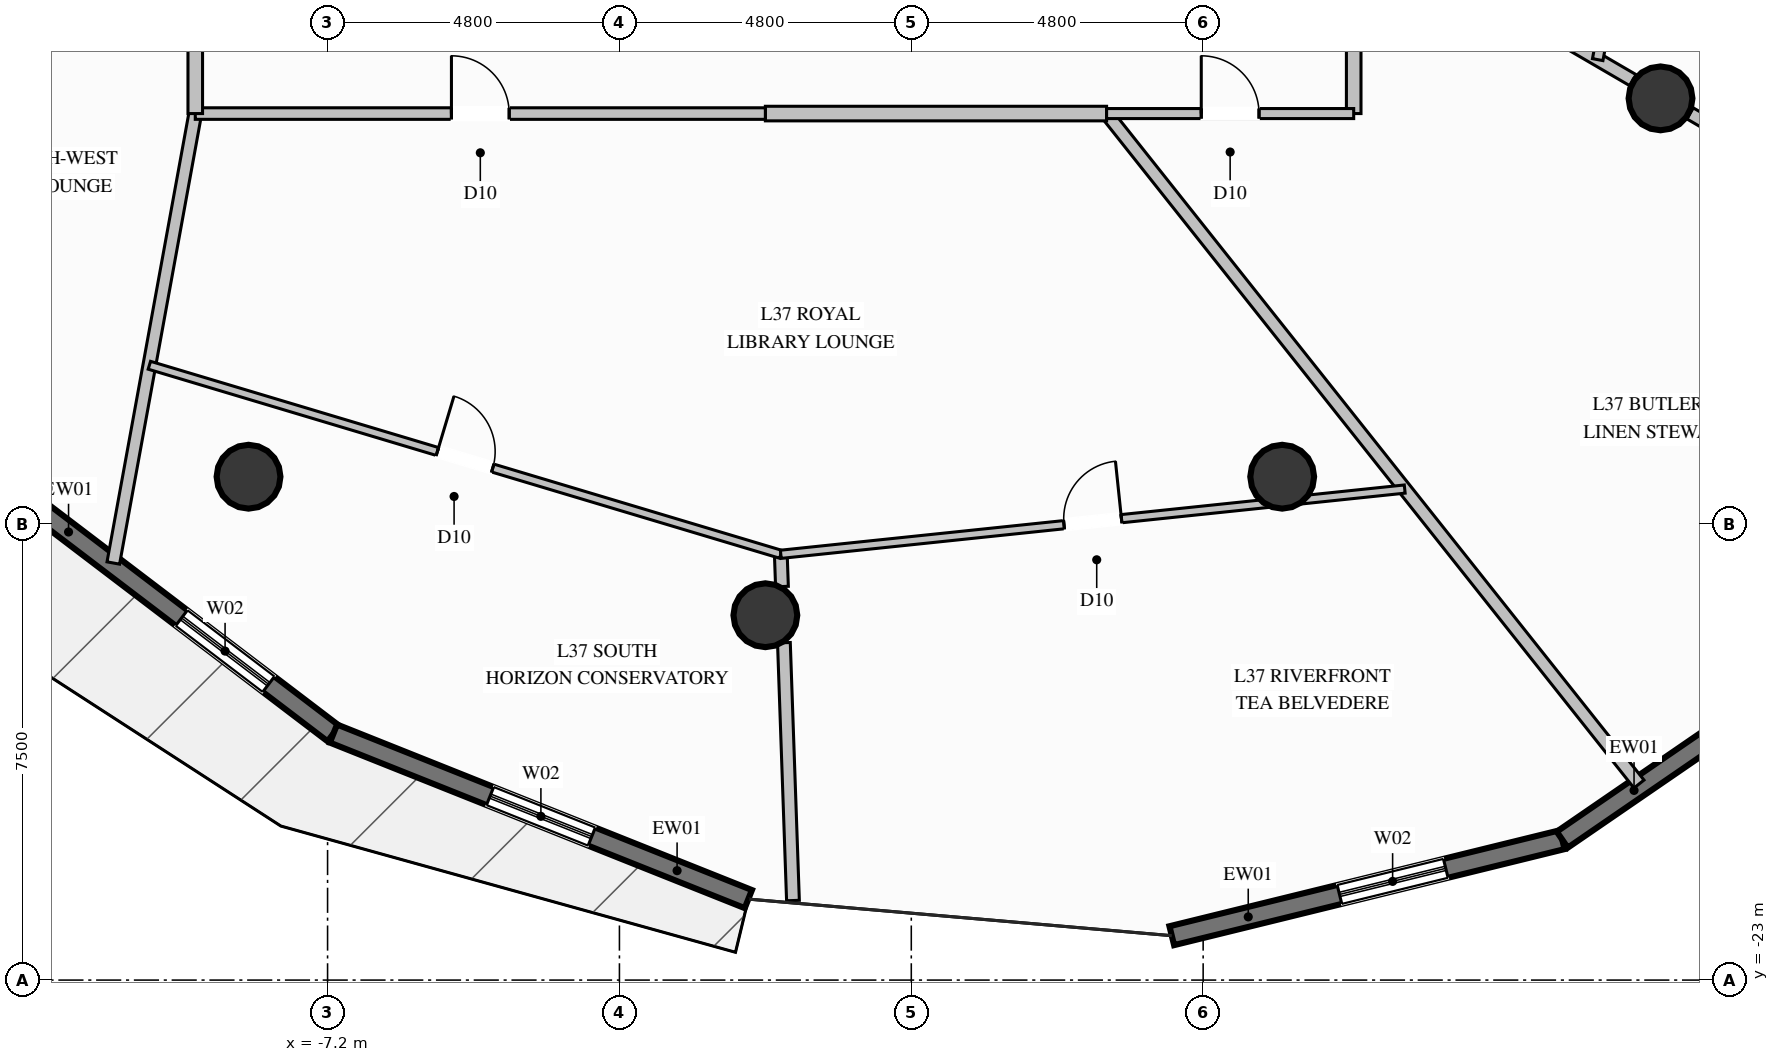
"""IFC4 building model, lengths in metres.
Left out: names, types, materials, properties, quantities, classifications, styles, units other than length and angle.
Written with IfcOpenShell. Run it as: python <this file> out.ifc"""

import sys

from ifc_helpers import new_model, si_unit, direction, frame, frame_2d, origin, origin_2d, place, context, subcontext, project, spatial, rectangle, circle, extrude, element, fill, save


model = new_model("IFC4")
c1 = context("Model", 3, precision=1e-05, world=origin(), true_north=direction((0.0, 1.0)))
c2 = subcontext(c1, "Body", "Model", "MODEL_VIEW")
j1 = project(units=[si_unit("LENGTHUNIT", "METRE"), si_unit("PLANEANGLEUNIT", "RADIAN")], contexts=[c1])
p1 = place(None, origin())
s1 = spatial("IfcSite", under=j1, at=p1, CompositionType="ELEMENT")
p2 = place(p1, origin())
s2 = spatial("IfcBuilding", under=s1, at=p2, CompositionType="ELEMENT")
p3 = place(p2, frame((0.0, 0.0, 145.8)))
s3 = spatial("IfcBuildingStorey", under=s2, at=p3, CompositionType="ELEMENT", Elevation=145.8)
for number, where, z_axis, x_axis in (
    (1, (-8.5, -14.722, 0.0), (0.0, 0.0, 1.0), (1.0, 0.0, 0.0)),
    (2, (0.0, -17.0, 0.0), (0.0, 0.0, 1.0), (1.0, 0.0, 0.0)),
    (3, (8.5, -14.722, 0.0), (0.0, 0.0, 1.0), (1.0, 0.0, 0.0)),
    (4, (14.722, -8.5, 0.0), (0.0, 0.0, 1.0), (1.0, 0.0, 0.0)),
):
    element("IfcColumn", number, at=place(p3, frame(where, z_axis=z_axis, x_axis=x_axis)), inside=s3, PredefinedType="COLUMN", context=c2, shape_type="SweptSolid", body=[
        extrude(circle(Radius=0.525, at=origin_2d()), origin(), (0.0, 0.0, 1.0), 3.6),
    ])
p4 = place(p3, frame((-7.103, -18.946, 0.0), z_axis=(0.0, 0.0, 1.0), x_axis=(-0.795837829304, 0.605509826054, 0.0)))
e5 = element("IfcWall", 5, at=p4, inside=s3, PredefinedType="SOLIDWALL", context=c2, shape_type="SweptSolid", body=[
    extrude(rectangle(XDim=7.559, YDim=0.32, at=frame_2d((3.78, 0.0))), origin(), (0.0, 0.0, 1.0), 3.35),
])
p5 = place(p4, frame((1.34, 0.0, 0.35)))
e6 = element("IfcOpeningElement", 6, at=p5, cuts=e5, PredefinedType="OPENING", context=c2, shape_type="SweptSolid", body=[
    extrude(rectangle(XDim=1.8, YDim=2.6, at=frame_2d((0.9, 1.3))), frame((0.0, 0.17, 0.0), z_axis=(0.0, -1.0, 0.0), x_axis=(1.0, 0.0, 0.0)), (0.0, 0.0, 1.0), 0.34),
])
p6 = place(p3, frame((-0.28, -21.668, 0.0), z_axis=(0.0, 0.0, 1.0), x_axis=(-0.928817816333, 0.37053672431, 0.0)))
e7 = element("IfcWall", 7, at=p6, inside=s3, PredefinedType="SOLIDWALL", context=c2, shape_type="SweptSolid", body=[
    extrude(rectangle(XDim=7.346, YDim=0.32, at=frame_2d((3.673, 0.0))), origin(), (0.0, 0.0, 1.0), 3.35),
])
p7 = place(p6, frame((2.773, 0.0, 0.35)))
e8 = element("IfcOpeningElement", 8, at=p7, cuts=e7, PredefinedType="OPENING", context=c2, shape_type="SweptSolid", body=[
    extrude(rectangle(XDim=1.8, YDim=2.6, at=frame_2d((0.9, 1.3))), frame((0.0, 0.17, 0.0), z_axis=(0.0, -1.0, 0.0), x_axis=(1.0, 0.0, 0.0)), (0.0, 0.0, 1.0), 0.34),
])
p8 = place(p3, frame((13.106, -20.691, 0.0), z_axis=(0.0, 0.0, 1.0), x_axis=(-0.971073377094, -0.238781272926, 0.0)))
e9 = element("IfcWall", 9, at=p8, inside=s3, PredefinedType="SOLIDWALL", context=c2, shape_type="SweptSolid", body=[
    extrude(rectangle(XDim=6.613, YDim=0.32, at=frame_2d((3.307, 0.0))), origin(), (0.0, 0.0, 1.0), 3.35),
])
p9 = place(p8, frame((1.973, 0.0, 0.35)))
e10 = element("IfcOpeningElement", 10, at=p9, cuts=e9, PredefinedType="OPENING", context=c2, shape_type="SweptSolid", body=[
    extrude(rectangle(XDim=1.8, YDim=2.6, at=frame_2d((0.9, 1.3))), frame((0.0, 0.17, 0.0), z_axis=(0.0, -1.0, 0.0), x_axis=(1.0, 0.0, 0.0)), (0.0, 0.0, 1.0), 0.34),
])
p10 = place(p3, frame((18.357, -17.087, 0.0), z_axis=(0.0, 0.0, 1.0), x_axis=(-0.824484596177, -0.565884396911, 0.0)))
e11 = element("IfcWall", 11, at=p10, inside=s3, PredefinedType="SOLIDWALL", context=c2, shape_type="SweptSolid", body=[
    extrude(rectangle(XDim=6.369, YDim=0.32, at=frame_2d((3.185, 0.0))), origin(), (0.0, 0.0, 1.0), 3.35),
])
p11 = place(p10, frame((1.455, 0.0, 0.35)))
e12 = element("IfcOpeningElement", 12, at=p11, cuts=e11, PredefinedType="OPENING", context=c2, shape_type="SweptSolid", body=[
    extrude(rectangle(XDim=1.8, YDim=2.6, at=frame_2d((0.9, 1.3))), frame((0.0, 0.17, 0.0), z_axis=(0.0, -1.0, 0.0), x_axis=(1.0, 0.0, 0.0)), (0.0, 0.0, 1.0), 0.34),
])
p12 = place(p3, frame((-9.376, -5.525, 0.0), z_axis=(0.0, 0.0, 1.0), x_axis=(-0.8717334026, -0.489980484092, 0.0)))
e13 = element("IfcWall", 13, at=p12, inside=s3, PredefinedType="PARTITIONING", context=c2, shape_type="SweptSolid", body=[
    extrude(rectangle(XDim=5.574, YDim=0.21, at=frame_2d((2.787, 0.0))), origin(), (0.0, 0.0, 1.0), 2.791),
])
p13 = place(p3, frame((9.676, -5.525, 0.0), z_axis=(0.0, 0.0, 1.0), x_axis=(0.864030429533, -0.503439586088, 0.0)))
e14 = element("IfcWall", 14, at=p13, inside=s3, PredefinedType="PARTITIONING", context=c2, shape_type="SweptSolid", body=[
    extrude(rectangle(XDim=5.313, YDim=0.21, at=frame_2d((2.657, 0.0))), origin(), (0.0, 0.0, 1.0), 2.791),
])
p14 = place(p3, frame((15.208, -8.747, 0.0), z_axis=(0.0, 0.0, 1.0), x_axis=(0.864059428721, -0.503389812808, 0.0)))
e15 = element("IfcWall", 15, at=p14, inside=s3, PredefinedType="PARTITIONING", context=c2, shape_type="SweptSolid", body=[
    extrude(rectangle(XDim=7.256, YDim=0.21, at=frame_2d((3.628, 0.0))), origin(), (0.0, 0.0, 1.0), 3.35),
])
p15 = place(p3, frame((13.689, -7.863, 0.0), z_axis=(0.0, 0.0, 1.0), x_axis=(0.185039216189, 0.982731137429, 0.0)))
e16 = element("IfcWall", 16, at=p15, inside=s3, PredefinedType="PLUMBINGWALL", context=c2, shape_type="SweptSolid", body=[
    extrude(rectangle(XDim=3.318, YDim=0.175, at=frame_2d((1.659, 0.0))), origin(), (0.0, 0.0, 1.0), 3.35),
])
p16 = place(p3, frame((5.612, -8.75, 0.0), z_axis=(0.0, 0.0, 1.0), x_axis=(0.62188276913, -0.783110350755, 0.0)))
e17 = element("IfcWall", 17, at=p16, inside=s3, PredefinedType="PARTITIONING", context=c2, shape_type="SweptSolid", body=[
    extrude(rectangle(XDim=14.08, YDim=0.21, at=frame_2d((7.04, 0.0))), origin(), (0.0, 0.0, 1.0), 3.35),
])
p17 = place(p3, frame((-9.376, -8.75, 0.0), z_axis=(0.0, 0.0, 1.0), x_axis=(-0.179440173007, -0.983768887652, 0.0)))
e18 = element("IfcWall", 18, at=p17, inside=s3, PredefinedType="PARTITIONING", context=c2, shape_type="SweptSolid", body=[
    extrude(rectangle(XDim=7.513, YDim=0.21, at=frame_2d((3.756, 0.0))), origin(), (0.0, 0.0, 1.0), 3.35),
])
p18 = place(p3, frame((0.0, -8.75, 0.0), z_axis=(0.0, 0.0, 1.0), x_axis=(1.0, 0.0, 0.0)))
e19 = element("IfcWall", 19, at=p18, inside=s3, PredefinedType="PARTITIONING", context=c2, shape_type="SweptSolid", body=[
    extrude(rectangle(XDim=5.612, YDim=0.24, at=frame_2d((2.806, 0.0))), origin(), (0.0, 0.0, 1.0), 3.35),
])
p19 = place(p3, frame((-9.376, -8.75, 0.0), z_axis=(0.0, 0.0, 1.0), x_axis=(1.0, 0.0, 0.0)))
e20 = element("IfcWall", 20, at=p19, inside=s3, PredefinedType="PARTITIONING", context=c2, shape_type="SweptSolid", body=[
    extrude(rectangle(XDim=9.376, YDim=0.19, at=frame_2d((4.688, 0.0))), origin(), (0.0, 0.0, 1.0), 3.35),
])
p20 = place(p19, frame((4.213, 0.0, 0.0)))
e21 = element("IfcOpeningElement", 21, at=p20, cuts=e20, PredefinedType="OPENING", context=c2, shape_type="SweptSolid", body=[
    extrude(rectangle(XDim=0.95, YDim=2.1, at=frame_2d((0.475, 1.05))), frame((0.0, 0.105, 0.0), z_axis=(0.0, -1.0, 0.0), x_axis=(1.0, 0.0, 0.0)), (0.0, 0.0, 1.0), 0.21),
])
p21 = place(p3, frame((-9.376, -5.525, 0.0), z_axis=(0.0, 0.0, 1.0), x_axis=(0.0, -1.0, 0.0)))
e22 = element("IfcWall", 22, at=p21, inside=s3, PredefinedType="PARTITIONING", context=c2, shape_type="SweptSolid", body=[
    extrude(rectangle(XDim=3.225, YDim=0.24, at=frame_2d((1.613, 0.0))), origin(), (0.0, 0.0, 1.0), 3.35),
])
p22 = place(p21, frame((1.112, 0.0, 0.0)))
e23 = element("IfcOpeningElement", 23, at=p22, cuts=e22, PredefinedType="OPENING", context=c2, shape_type="SweptSolid", body=[
    extrude(rectangle(XDim=1.0, YDim=2.2, at=frame_2d((0.5, 1.1))), frame((0.0, 0.13, 0.0), z_axis=(0.0, -1.0, 0.0), x_axis=(1.0, 0.0, 0.0)), (0.0, 0.0, 1.0), 0.26),
])
p23 = place(p3, frame((0.254, -15.998, 0.0), z_axis=(0.0, 0.0, 1.0), x_axis=(0.035904977548, -0.999355208416, 0.0)))
e24 = element("IfcWall", 24, at=p23, inside=s3, PredefinedType="PARTITIONING", context=c2, shape_type="SweptSolid", body=[
    extrude(rectangle(XDim=0.53, YDim=0.21, at=frame_2d((0.265, 0.0))), origin(), (0.0, 0.0, 1.0), 3.35),
])
p24 = place(p3, frame((0.305, -17.452, 0.0), z_axis=(0.0, 0.0, 1.0), x_axis=(0.035159913523, -0.999381699093, 0.0)))
e25 = element("IfcWall", 25, at=p24, inside=s3, PredefinedType="PARTITIONING", context=c2, shape_type="SweptSolid", body=[
    extrude(rectangle(XDim=4.243, YDim=0.21, at=frame_2d((2.121, 0.0))), origin(), (0.0, 0.0, 1.0), 3.35),
])
p25 = place(p3, frame((-10.131, -12.889, 0.0), z_axis=(0.0, 0.0, 1.0), x_axis=(0.957987914755, -0.286808568879, 0.0)))
e26 = element("IfcWall", 26, at=p25, inside=s3, PredefinedType="PARTITIONING", context=c2, shape_type="SweptSolid", body=[
    extrude(rectangle(XDim=10.84, YDim=0.135, at=frame_2d((5.42, 0.0))), origin(), (0.0, 0.0, 1.0), 2.879),
])
p26 = place(p25, frame((4.945, 0.0, 0.0)))
e27 = element("IfcOpeningElement", 27, at=p26, cuts=e26, PredefinedType="OPENING", context=c2, shape_type="SweptSolid", body=[
    extrude(rectangle(XDim=0.95, YDim=2.1, at=frame_2d((0.475, 1.05))), frame((0.0, 0.078, 0.0), z_axis=(0.0, -1.0, 0.0), x_axis=(1.0, 0.0, 0.0)), (0.0, 0.0, 1.0), 0.155),
])
p27 = place(p3, frame((0.254, -15.998, 0.0), z_axis=(0.0, 0.0, 1.0), x_axis=(0.994576924976, 0.104003559097, 0.0)))
e28 = element("IfcWall", 28, at=p27, inside=s3, PredefinedType="PARTITIONING", context=c2, shape_type="SweptSolid", body=[
    extrude(rectangle(XDim=10.317, YDim=0.135, at=frame_2d((5.158, 0.0))), origin(), (0.0, 0.0, 1.0), 2.879),
])
p28 = place(p27, frame((4.683, 0.0, 0.0)))
e29 = element("IfcOpeningElement", 29, at=p28, cuts=e28, PredefinedType="OPENING", context=c2, shape_type="SweptSolid", body=[
    extrude(rectangle(XDim=0.95, YDim=2.1, at=frame_2d((0.475, 1.05))), frame((0.0, 0.078, 0.0), z_axis=(0.0, -1.0, 0.0), x_axis=(1.0, 0.0, 0.0)), (0.0, 0.0, 1.0), 0.155),
])
p29 = place(p3, frame((9.676, -8.75, 0.0), z_axis=(0.0, 0.0, 1.0), x_axis=(0.0, 1.0, 0.0)))
e30 = element("IfcWall", 30, at=p29, inside=s3, PredefinedType="PARTITIONING", context=c2, shape_type="SweptSolid", body=[
    extrude(rectangle(XDim=3.225, YDim=0.24, at=frame_2d((1.613, 0.0))), origin(), (0.0, 0.0, 1.0), 3.35),
])
p30 = place(p3, frame((5.612, -8.75, 0.0), z_axis=(0.0, 0.0, 1.0), x_axis=(1.0, 0.0, 0.0)))
e31 = element("IfcWall", 31, at=p30, inside=s3, PredefinedType="PARTITIONING", context=c2, shape_type="SweptSolid", body=[
    extrude(rectangle(XDim=4.064, YDim=0.165, at=frame_2d((2.032, 0.0))), origin(), (0.0, 0.0, 1.0), 3.35),
])
p31 = place(p30, frame((1.557, 0.0, 0.0)))
e32 = element("IfcOpeningElement", 32, at=p31, cuts=e31, PredefinedType="OPENING", context=c2, shape_type="SweptSolid", body=[
    extrude(rectangle(XDim=0.95, YDim=2.1, at=frame_2d((0.475, 1.05))), frame((0.0, 0.093, 0.0), z_axis=(0.0, -1.0, 0.0), x_axis=(1.0, 0.0, 0.0)), (0.0, 0.0, 1.0), 0.185),
])
p32 = place(p5, origin())
e33 = element("IfcWindow", 33, at=p32, inside=s3, PartitioningType="SINGLE_PANEL", PredefinedType="WINDOW", context=c2, shape_type="SweptSolid", body=[
    extrude(rectangle(XDim=1.8, YDim=2.6, at=frame_2d((0.9, 1.3))), frame((0.0, 0.03, 0.0), z_axis=(0.0, -1.0, 0.0), x_axis=(1.0, 0.0, 0.0)), (0.0, 0.0, 1.0), 0.06),
])
fill(e6, e33)
p33 = place(p7, origin())
e34 = element("IfcWindow", 34, at=p33, inside=s3, PartitioningType="SINGLE_PANEL", PredefinedType="WINDOW", context=c2, shape_type="SweptSolid", body=[
    extrude(rectangle(XDim=1.8, YDim=2.6, at=frame_2d((0.9, 1.3))), frame((0.0, 0.03, 0.0), z_axis=(0.0, -1.0, 0.0), x_axis=(1.0, 0.0, 0.0)), (0.0, 0.0, 1.0), 0.06),
])
fill(e8, e34)
p34 = place(p9, origin())
e35 = element("IfcWindow", 35, at=p34, inside=s3, PartitioningType="SINGLE_PANEL", PredefinedType="WINDOW", context=c2, shape_type="SweptSolid", body=[
    extrude(rectangle(XDim=1.8, YDim=2.6, at=frame_2d((0.9, 1.3))), frame((0.0, 0.03, 0.0), z_axis=(0.0, -1.0, 0.0), x_axis=(1.0, 0.0, 0.0)), (0.0, 0.0, 1.0), 0.06),
])
fill(e10, e35)
p35 = place(p20, origin())
e36 = element("IfcDoor", 36, at=p35, inside=s3, OperationType="SINGLE_SWING_LEFT", PredefinedType="DOOR", context=c2, shape_type="SweptSolid", body=[
    extrude(rectangle(XDim=0.95, YDim=2.1, at=frame_2d((0.475, 1.05))), frame((0.0, 0.025, 0.0), z_axis=(0.0, -1.0, 0.0), x_axis=(1.0, 0.0, 0.0)), (0.0, 0.0, 1.0), 0.05),
])
fill(e21, e36)
p36 = place(p26, origin())
e37 = element("IfcDoor", 37, at=p36, inside=s3, OperationType="SINGLE_SWING_LEFT", PredefinedType="DOOR", context=c2, shape_type="SweptSolid", body=[
    extrude(rectangle(XDim=0.95, YDim=2.1, at=frame_2d((0.475, 1.05))), frame((0.0, 0.025, 0.0), z_axis=(0.0, -1.0, 0.0), x_axis=(1.0, 0.0, 0.0)), (0.0, 0.0, 1.0), 0.05),
])
fill(e27, e37)
p37 = place(p28, origin())
e38 = element("IfcDoor", 38, at=p37, inside=s3, OperationType="SINGLE_SWING_RIGHT", PredefinedType="DOOR", context=c2, shape_type="SweptSolid", body=[
    extrude(rectangle(XDim=0.95, YDim=2.1, at=frame_2d((0.475, 1.05))), frame((0.0, 0.025, 0.0), z_axis=(0.0, -1.0, 0.0), x_axis=(1.0, 0.0, 0.0)), (0.0, 0.0, 1.0), 0.05),
])
fill(e29, e38)
p38 = place(p31, origin())
e39 = element("IfcDoor", 39, at=p38, inside=s3, OperationType="SINGLE_SWING_LEFT", PredefinedType="DOOR", context=c2, shape_type="SweptSolid", body=[
    extrude(rectangle(XDim=0.95, YDim=2.1, at=frame_2d((0.475, 1.05))), frame((0.0, 0.025, 0.0), z_axis=(0.0, -1.0, 0.0), x_axis=(1.0, 0.0, 0.0)), (0.0, 0.0, 1.0), 0.05),
])
fill(e32, e39)
save(model, sys.argv[1])
